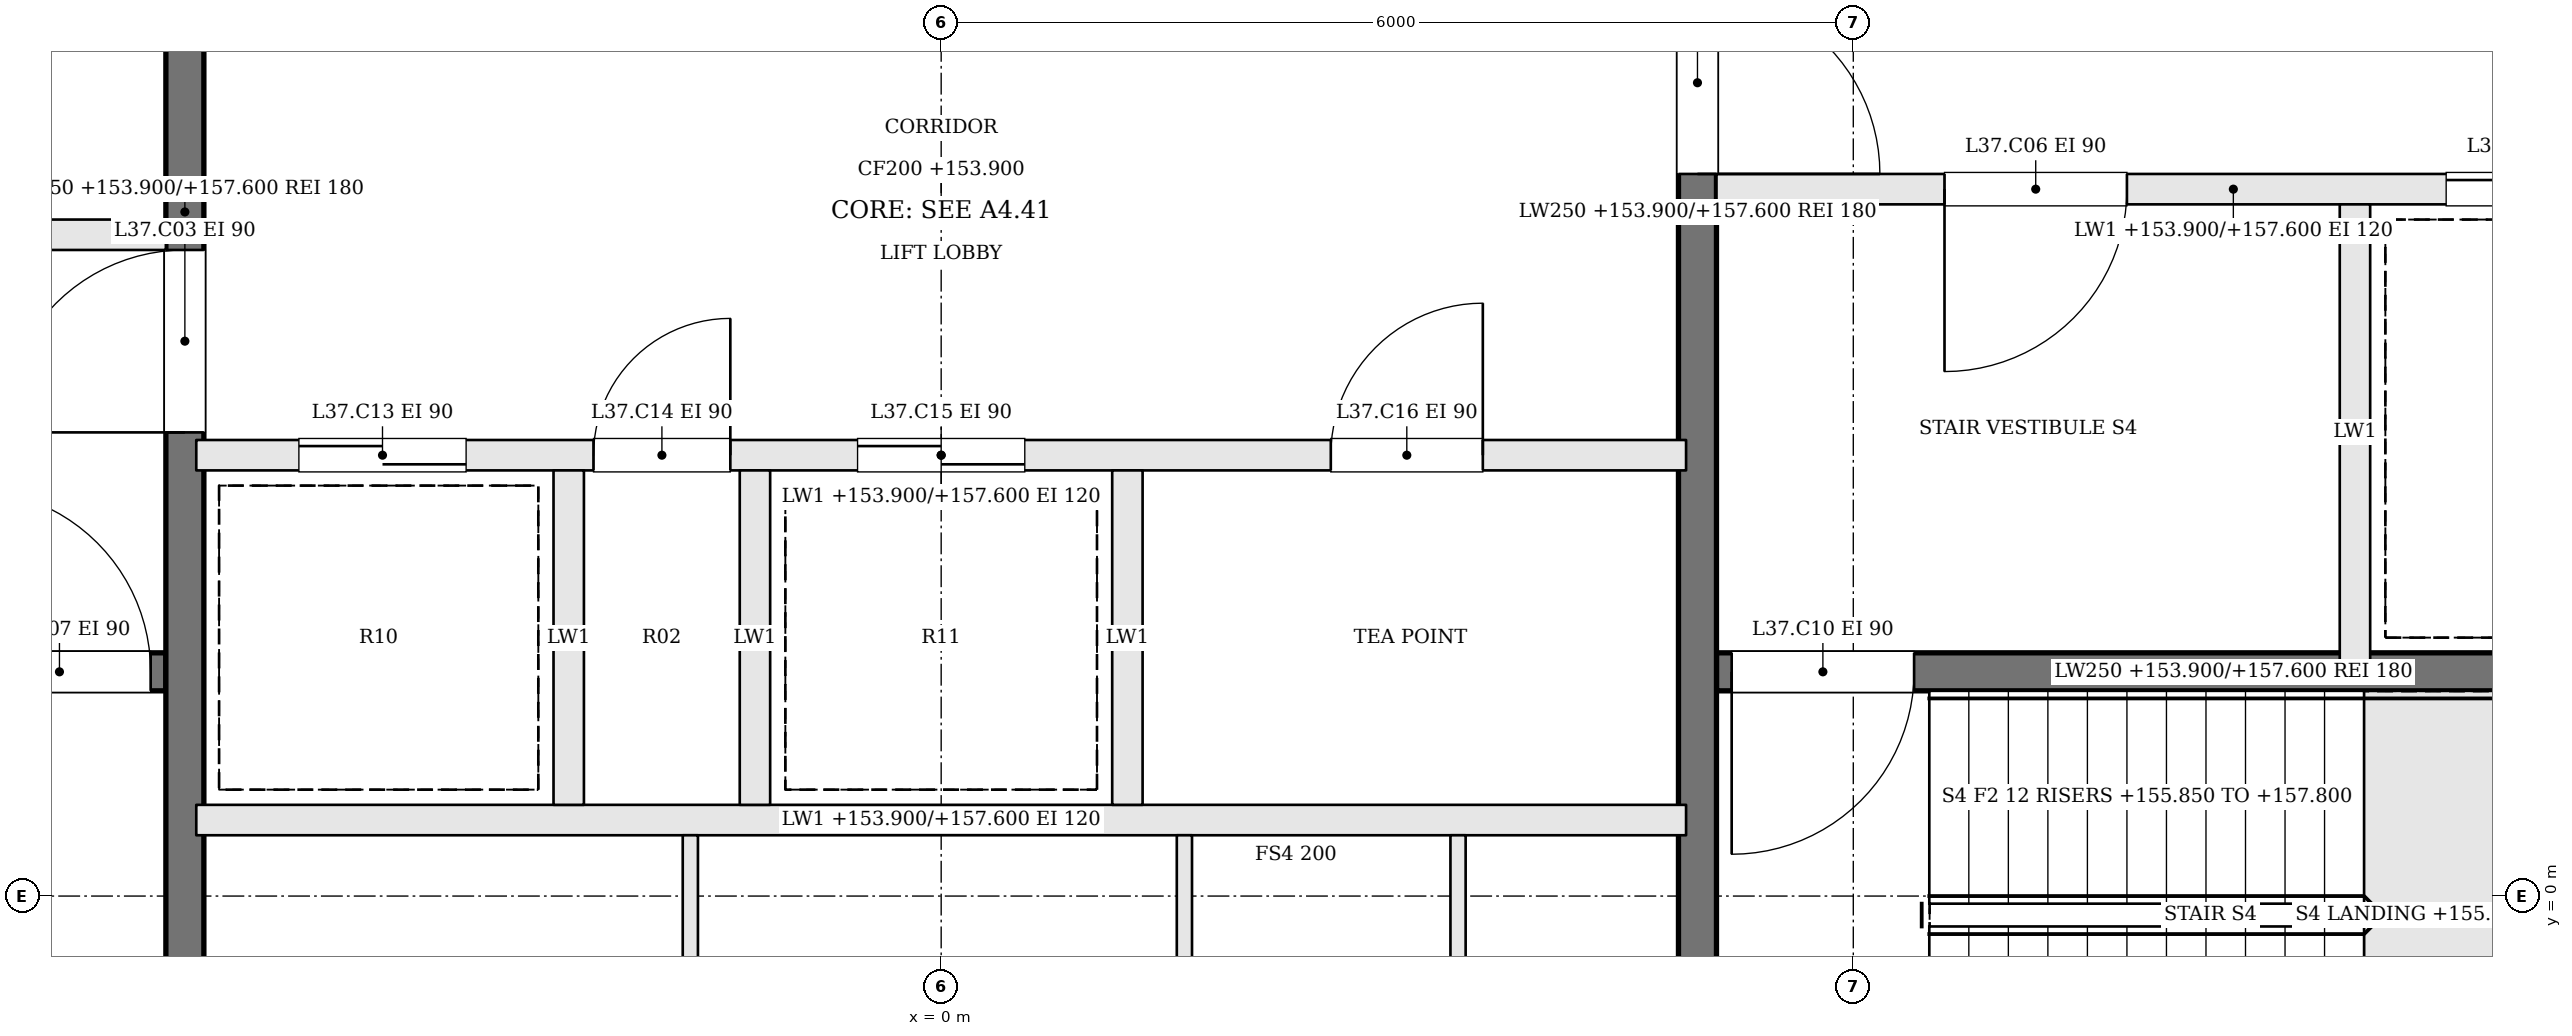
"""IFC4 building model, lengths in metres.
Left out: names, types, materials, properties, quantities, classifications, styles, units other than length and angle.
Written with IfcOpenShell. Run it as: python <this file> out.ifc"""

import sys

from ifc_helpers import new_model, si_unit, direction, frame, frame_2d, origin, place, context, subcontext, project, spatial, rectangle, extrude, element, fill, save


model = new_model("IFC4")
c1 = context("Model", 3, precision=1e-05, world=origin(), true_north=direction((0.0, 1.0)))
c2 = subcontext(c1, "Body", "Model", "MODEL_VIEW")
j1 = project(units=[si_unit("LENGTHUNIT", "METRE"), si_unit("PLANEANGLEUNIT", "RADIAN")], contexts=[c1])
p1 = place(None, origin())
s1 = spatial("IfcSite", under=j1, at=p1, CompositionType="ELEMENT")
p2 = place(p1, origin())
s2 = spatial("IfcBuilding", under=s1, at=p2, CompositionType="ELEMENT")
p3 = place(p2, frame((0.0, 0.0, 153.9)))
s3 = spatial("IfcBuildingStorey", under=s2, at=p3, CompositionType="ELEMENT", Elevation=153.9)
p4 = place(p3, frame((-11.9, 1.475, 0.0), z_axis=(0.0, 0.0, 1.0), x_axis=(1.0, 0.0, 0.0)))
e1 = element("IfcWall", 1, at=p4, inside=s3, PredefinedType="SOLIDWALL", context=c2, shape_type="SweptSolid", body=[
    extrude(rectangle(XDim=6.8, YDim=0.25, at=frame_2d((3.4, 0.0))), origin(), (0.0, 0.0, 1.0), 3.7),
])
p5 = place(p4, frame((5.5, 0.0, 0.0)))
e2 = element("IfcOpeningElement", 2, at=p5, cuts=e1, PredefinedType="OPENING", context=c2, shape_type="SweptSolid", body=[
    extrude(rectangle(XDim=1.2, YDim=2.1, at=frame_2d((0.6, 1.05))), frame((0.0, 0.135, 0.0), z_axis=(0.0, -1.0, 0.0), x_axis=(1.0, 0.0, 0.0)), (0.0, 0.0, 1.0), 0.27),
])
p6 = place(p3, frame((-11.9, 4.35, 0.0), z_axis=(0.0, 0.0, 1.0), x_axis=(1.0, 0.0, 0.0)))
e3 = element("IfcWall", 3, at=p6, inside=s3, PredefinedType="SOLIDWALL", context=c2, shape_type="SweptSolid", body=[
    extrude(rectangle(XDim=6.8, YDim=0.2, at=frame_2d((3.4, 0.0))), origin(), (0.0, 0.0, 1.0), 3.7),
])
p7 = place(p6, frame((4.1, 0.0, 0.0)))
e4 = element("IfcOpeningElement", 4, at=p7, cuts=e3, PredefinedType="OPENING", context=c2, shape_type="SweptSolid", body=[
    extrude(rectangle(XDim=1.2, YDim=2.1, at=frame_2d((0.6, 1.05))), frame((0.0, 0.11, 0.0), z_axis=(0.0, -1.0, 0.0), x_axis=(1.0, 0.0, 0.0)), (0.0, 0.0, 1.0), 0.22),
])
p8 = place(p6, frame((0.8, 0.0, 0.0)))
e5 = element("IfcOpeningElement", 5, at=p8, cuts=e3, PredefinedType="OPENING", context=c2, shape_type="SweptSolid", body=[
    extrude(rectangle(XDim=1.2, YDim=2.1, at=frame_2d((0.6, 1.05))), frame((0.0, 0.11, 0.0), z_axis=(0.0, -1.0, 0.0), x_axis=(1.0, 0.0, 0.0)), (0.0, 0.0, 1.0), 0.22),
])
p9 = place(p3, frame((11.9, 4.65, 0.0), z_axis=(0.0, 0.0, 1.0), x_axis=(-1.0, 0.0, 0.0)))
e6 = element("IfcWall", 6, at=p9, inside=s3, PredefinedType="SOLIDWALL", context=c2, shape_type="SweptSolid", body=[
    extrude(rectangle(XDim=6.8, YDim=0.2, at=frame_2d((3.4, 0.0))), origin(), (0.0, 0.0, 1.0), 3.7),
])
p10 = place(p9, frame((4.1, 0.0, 0.0)))
e7 = element("IfcOpeningElement", 7, at=p10, cuts=e6, PredefinedType="OPENING", context=c2, shape_type="SweptSolid", body=[
    extrude(rectangle(XDim=1.2, YDim=2.1, at=frame_2d((0.6, 1.05))), frame((0.0, 0.11, 0.0), z_axis=(0.0, -1.0, 0.0), x_axis=(1.0, 0.0, 0.0)), (0.0, 0.0, 1.0), 0.22),
])
p11 = place(p9, frame((0.8, 0.0, 0.0)))
e8 = element("IfcOpeningElement", 8, at=p11, cuts=e6, PredefinedType="OPENING", context=c2, shape_type="SweptSolid", body=[
    extrude(rectangle(XDim=1.2, YDim=2.1, at=frame_2d((0.6, 1.05))), frame((0.0, 0.11, 0.0), z_axis=(0.0, -1.0, 0.0), x_axis=(1.0, 0.0, 0.0)), (0.0, 0.0, 1.0), 0.22),
])
p12 = place(p3, frame((11.9, 1.475, 0.0), z_axis=(0.0, 0.0, 1.0), x_axis=(-1.0, 0.0, 0.0)))
e9 = element("IfcWall", 9, at=p12, inside=s3, PredefinedType="SOLIDWALL", context=c2, shape_type="SweptSolid", body=[
    extrude(rectangle(XDim=6.8, YDim=0.25, at=frame_2d((3.4, 0.0))), origin(), (0.0, 0.0, 1.0), 3.7),
])
p13 = place(p12, frame((5.5, 0.0, 0.0)))
e10 = element("IfcOpeningElement", 10, at=p13, cuts=e9, PredefinedType="OPENING", context=c2, shape_type="SweptSolid", body=[
    extrude(rectangle(XDim=1.2, YDim=2.1, at=frame_2d((0.6, 1.05))), frame((0.0, 0.135, 0.0), z_axis=(0.0, -1.0, 0.0), x_axis=(1.0, 0.0, 0.0)), (0.0, 0.0, 1.0), 0.27),
])
p14 = place(p3, frame((9.3, 4.55, 0.0), z_axis=(0.0, 0.0, 1.0), x_axis=(0.0, -1.0, 0.0)))
e11 = element("IfcWall", 11, at=p14, inside=s3, PredefinedType="SOLIDWALL", context=c2, shape_type="SweptSolid", body=[
    extrude(rectangle(XDim=3.0, YDim=0.2, at=frame_2d((1.5, 0.0))), origin(), (0.0, 0.0, 1.0), 3.7),
])
p15 = place(p3, frame((-4.975, -1.9, 0.0), z_axis=(0.0, 0.0, 1.0), x_axis=(0.0, 1.0, 0.0)))
e12 = element("IfcWall", 12, at=p15, inside=s3, PredefinedType="SOLIDWALL", context=c2, shape_type="SweptSolid", body=[
    extrude(rectangle(XDim=12.8, YDim=0.25, at=frame_2d((6.4, 0.0))), origin(), (0.0, 0.0, 1.0), 3.7),
])
p16 = place(p15, frame((4.95, 0.0, 0.0)))
e13 = element("IfcOpeningElement", 13, at=p16, cuts=e12, PredefinedType="OPENING", context=c2, shape_type="SweptSolid", body=[
    extrude(rectangle(XDim=1.2, YDim=2.1, at=frame_2d((0.6, 1.05))), frame((0.0, 0.135, 0.0), z_axis=(0.0, -1.0, 0.0), x_axis=(1.0, 0.0, 0.0)), (0.0, 0.0, 1.0), 0.27),
])
p17 = place(p3, frame((4.975, 10.9, 0.0), z_axis=(0.0, 0.0, 1.0), x_axis=(0.0, -1.0, 0.0)))
e14 = element("IfcWall", 14, at=p17, inside=s3, PredefinedType="SOLIDWALL", context=c2, shape_type="SweptSolid", body=[
    extrude(rectangle(XDim=12.8, YDim=0.25, at=frame_2d((6.4, 0.0))), origin(), (0.0, 0.0, 1.0), 3.7),
])
p18 = place(p17, frame((4.95, 0.0, 0.0)))
e15 = element("IfcOpeningElement", 15, at=p18, cuts=e14, PredefinedType="OPENING", context=c2, shape_type="SweptSolid", body=[
    extrude(rectangle(XDim=1.2, YDim=2.1, at=frame_2d((0.6, 1.05))), frame((0.0, 0.135, 0.0), z_axis=(0.0, -1.0, 0.0), x_axis=(1.0, 0.0, 0.0)), (0.0, 0.0, 1.0), 0.27),
])
p19 = place(p3, frame((-4.9, 0.5, 0.0), z_axis=(0.0, 0.0, 1.0), x_axis=(1.0, 0.0, 0.0)))
e16 = element("IfcWall", 16, at=p19, inside=s3, PredefinedType="SOLIDWALL", context=c2, shape_type="SweptSolid", body=[
    extrude(rectangle(XDim=9.8, YDim=0.2, at=frame_2d((4.9, 0.0))), origin(), (0.0, 0.0, 1.0), 3.7),
])
p20 = place(p3, frame((-4.9, 2.9, 0.0), z_axis=(0.0, 0.0, 1.0), x_axis=(1.0, 0.0, 0.0)))
e17 = element("IfcWall", 17, at=p20, inside=s3, PredefinedType="SOLIDWALL", context=c2, shape_type="SweptSolid", body=[
    extrude(rectangle(XDim=9.8, YDim=0.2, at=frame_2d((4.9, 0.0))), origin(), (0.0, 0.0, 1.0), 3.7),
])
p21 = place(p20, frame((0.675, 0.0, 0.0)))
e18 = element("IfcOpeningElement", 18, at=p21, cuts=e17, PredefinedType="OPENING", context=c2, shape_type="SweptSolid", body=[
    extrude(rectangle(XDim=1.1, YDim=2.1, at=frame_2d((0.55, 1.05))), frame((0.0, 0.11, 0.0), z_axis=(0.0, -1.0, 0.0), x_axis=(1.0, 0.0, 0.0)), (0.0, 0.0, 1.0), 0.22),
])
p22 = place(p20, frame((2.613, 0.0, 0.0)))
e19 = element("IfcOpeningElement", 19, at=p22, cuts=e17, PredefinedType="OPENING", context=c2, shape_type="SweptSolid", body=[
    extrude(rectangle(XDim=0.9, YDim=2.1, at=frame_2d((0.45, 1.05))), frame((0.0, 0.11, 0.0), z_axis=(0.0, -1.0, 0.0), x_axis=(1.0, 0.0, 0.0)), (0.0, 0.0, 1.0), 0.22),
])
p23 = place(p20, frame((4.35, 0.0, 0.0)))
e20 = element("IfcOpeningElement", 20, at=p23, cuts=e17, PredefinedType="OPENING", context=c2, shape_type="SweptSolid", body=[
    extrude(rectangle(XDim=1.1, YDim=2.1, at=frame_2d((0.55, 1.05))), frame((0.0, 0.11, 0.0), z_axis=(0.0, -1.0, 0.0), x_axis=(1.0, 0.0, 0.0)), (0.0, 0.0, 1.0), 0.22),
])
p24 = place(p20, frame((7.463, 0.0, 0.0)))
e21 = element("IfcOpeningElement", 21, at=p24, cuts=e17, PredefinedType="OPENING", context=c2, shape_type="SweptSolid", body=[
    extrude(rectangle(XDim=1.0, YDim=2.1, at=frame_2d((0.5, 1.05))), frame((0.0, 0.11, 0.0), z_axis=(0.0, -1.0, 0.0), x_axis=(1.0, 0.0, 0.0)), (0.0, 0.0, 1.0), 0.22),
])
for number, where, z_axis, x_axis in (
    (22, (-2.45, 0.6, 0.0), (0.0, 0.0, 1.0), (0.0, 1.0, 0.0)),
    (23, (-1.225, 0.6, 0.0), (0.0, 0.0, 1.0), (0.0, 1.0, 0.0)),
    (24, (1.225, 0.6, 0.0), (0.0, 0.0, 1.0), (0.0, 1.0, 0.0)),
):
    element("IfcWall", number, at=place(p3, frame(where, z_axis=z_axis, x_axis=x_axis)), inside=s3, PredefinedType="SOLIDWALL", context=c2, shape_type="SweptSolid", body=[
        extrude(rectangle(XDim=2.2, YDim=0.2, at=frame_2d((1.1, 0.0))), origin(), (0.0, 0.0, 1.0), 3.7),
    ])
for number, where, z_axis, x_axis in (
    (25, (-1.65, -1.9, 0.0), (0.0, 0.0, 1.0), (0.0, 1.0, 0.0)),
    (26, (1.6, -1.9, 0.0), (0.0, 0.0, 1.0), (0.0, 1.0, 0.0)),
    (27, (3.4, -1.9, 0.0), (0.0, 0.0, 1.0), (0.0, 1.0, 0.0)),
):
    element("IfcWall", number, at=place(p3, frame(where, z_axis=z_axis, x_axis=x_axis)), inside=s3, PredefinedType="PARTITIONING", context=c2, shape_type="SweptSolid", body=[
        extrude(rectangle(XDim=2.3, YDim=0.1, at=frame_2d((1.15, 0.0))), origin(), (0.0, 0.0, 1.0), 3.7),
    ])
p25 = place(p16, origin())
e28 = element("IfcDoor", 28, at=p25, inside=s3, OperationType="SINGLE_SWING_LEFT", PredefinedType="DOOR", context=c2, shape_type="SweptSolid", body=[
    extrude(rectangle(XDim=1.2, YDim=2.1, at=frame_2d((0.6, 1.05))), frame((0.0, 0.025, 0.0), z_axis=(0.0, -1.0, 0.0), x_axis=(1.0, 0.0, 0.0)), (0.0, 0.0, 1.0), 0.05),
])
fill(e13, e28)
p26 = place(p18, origin())
e29 = element("IfcDoor", 29, at=p26, inside=s3, OperationType="SINGLE_SWING_RIGHT", PredefinedType="DOOR", context=c2, shape_type="SweptSolid", body=[
    extrude(rectangle(XDim=1.2, YDim=2.1, at=frame_2d((0.6, 1.05))), frame((0.0, 0.025, 0.0), z_axis=(0.0, -1.0, 0.0), x_axis=(1.0, 0.0, 0.0)), (0.0, 0.0, 1.0), 0.05),
])
fill(e15, e29)
p27 = place(p10, origin())
e30 = element("IfcDoor", 30, at=p27, inside=s3, OperationType="SINGLE_SWING_RIGHT", PredefinedType="DOOR", context=c2, shape_type="SweptSolid", body=[
    extrude(rectangle(XDim=1.2, YDim=2.1, at=frame_2d((0.6, 1.05))), frame((0.0, 0.025, 0.0), z_axis=(0.0, -1.0, 0.0), x_axis=(1.0, 0.0, 0.0)), (0.0, 0.0, 1.0), 0.05),
])
fill(e7, e30)
p28 = place(p5, origin())
e31 = element("IfcDoor", 31, at=p28, inside=s3, OperationType="SINGLE_SWING_LEFT", PredefinedType="DOOR", context=c2, shape_type="SweptSolid", body=[
    extrude(rectangle(XDim=1.2, YDim=2.1, at=frame_2d((0.6, 1.05))), frame((0.0, 0.025, 0.0), z_axis=(0.0, -1.0, 0.0), x_axis=(1.0, 0.0, 0.0)), (0.0, 0.0, 1.0), 0.05),
])
fill(e2, e31)
p29 = place(p13, origin())
e32 = element("IfcDoor", 32, at=p29, inside=s3, OperationType="SINGLE_SWING_RIGHT", PredefinedType="DOOR", context=c2, shape_type="SweptSolid", body=[
    extrude(rectangle(XDim=1.2, YDim=2.1, at=frame_2d((0.6, 1.05))), frame((0.0, 0.025, 0.0), z_axis=(0.0, -1.0, 0.0), x_axis=(1.0, 0.0, 0.0)), (0.0, 0.0, 1.0), 0.05),
])
fill(e10, e32)
p30 = place(p11, origin())
e33 = element("IfcDoor", 33, at=p30, inside=s3, OperationType="SLIDING_TO_RIGHT", PredefinedType="DOOR", context=c2, shape_type="SweptSolid", body=[
    extrude(rectangle(XDim=1.2, YDim=2.1, at=frame_2d((0.6, 1.05))), frame((0.0, 0.025, 0.0), z_axis=(0.0, -1.0, 0.0), x_axis=(1.0, 0.0, 0.0)), (0.0, 0.0, 1.0), 0.05),
])
fill(e8, e33)
p31 = place(p21, origin())
e34 = element("IfcDoor", 34, at=p31, inside=s3, OperationType="SLIDING_TO_RIGHT", PredefinedType="DOOR", context=c2, shape_type="SweptSolid", body=[
    extrude(rectangle(XDim=1.1, YDim=2.1, at=frame_2d((0.55, 1.05))), frame((0.0, 0.025, 0.0), z_axis=(0.0, -1.0, 0.0), x_axis=(1.0, 0.0, 0.0)), (0.0, 0.0, 1.0), 0.05),
])
fill(e18, e34)
p32 = place(p22, origin())
e35 = element("IfcDoor", 35, at=p32, inside=s3, OperationType="SINGLE_SWING_RIGHT", PredefinedType="DOOR", context=c2, shape_type="SweptSolid", body=[
    extrude(rectangle(XDim=0.9, YDim=2.1, at=frame_2d((0.45, 1.05))), frame((0.0, 0.025, 0.0), z_axis=(0.0, -1.0, 0.0), x_axis=(1.0, 0.0, 0.0)), (0.0, 0.0, 1.0), 0.05),
])
fill(e19, e35)
p33 = place(p23, origin())
e36 = element("IfcDoor", 36, at=p33, inside=s3, OperationType="SLIDING_TO_LEFT", PredefinedType="DOOR", context=c2, shape_type="SweptSolid", body=[
    extrude(rectangle(XDim=1.1, YDim=2.1, at=frame_2d((0.55, 1.05))), frame((0.0, 0.025, 0.0), z_axis=(0.0, -1.0, 0.0), x_axis=(1.0, 0.0, 0.0)), (0.0, 0.0, 1.0), 0.05),
])
fill(e20, e36)
p34 = place(p24, origin())
e37 = element("IfcDoor", 37, at=p34, inside=s3, OperationType="SINGLE_SWING_RIGHT", PredefinedType="DOOR", context=c2, shape_type="SweptSolid", body=[
    extrude(rectangle(XDim=1.0, YDim=2.1, at=frame_2d((0.5, 1.05))), frame((0.0, 0.025, 0.0), z_axis=(0.0, -1.0, 0.0), x_axis=(1.0, 0.0, 0.0)), (0.0, 0.0, 1.0), 0.05),
])
fill(e21, e37)
save(model, sys.argv[1])
